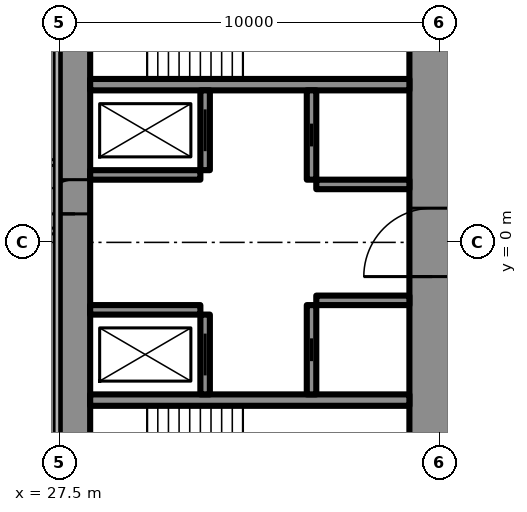
"""IFC4 building model, lengths in metres.
Left out: names, types, materials, properties, quantities, classifications, styles, units other than length and angle.
Written with IfcOpenShell. Run it as: python <this file> out.ifc"""

import sys

from ifc_helpers import new_model, si_unit, direction, frame, frame_2d, origin, place, context, subcontext, project, spatial, rectangle, extrude, element, fill, save


model = new_model("IFC4")
c1 = context("Model", 3, precision=1e-05, world=origin(), true_north=direction((0.0, 1.0)))
c2 = subcontext(c1, "Body", "Model", "MODEL_VIEW")
j1 = project(units=[si_unit("LENGTHUNIT", "METRE"), si_unit("PLANEANGLEUNIT", "RADIAN")], contexts=[c1])
p1 = place(None, origin())
s1 = spatial("IfcSite", under=j1, at=p1, CompositionType="ELEMENT")
p2 = place(p1, origin())
s2 = spatial("IfcBuilding", under=s1, at=p2, CompositionType="ELEMENT")
p3 = place(p2, frame((0.0, 0.0, 236.9)))
s3 = spatial("IfcBuildingStorey", under=s2, at=p3, CompositionType="ELEMENT", Elevation=236.9)
p4 = place(p3, frame((27.9, -8.6, 0.0), z_axis=(0.0, 0.0, 1.0), x_axis=(0.0, 1.0, 0.0)))
e1 = element("IfcWall", 1, at=p4, inside=s3, PredefinedType="SHEAR", context=c2, shape_type="SweptSolid", body=[
    extrude(rectangle(XDim=17.2, YDim=0.8, at=frame_2d((8.6, 0.0))), origin(), (0.0, 0.0, 1.0), 3.6),
])
p5 = place(p4, frame((9.35, 0.0, 0.0)))
e2 = element("IfcOpeningElement", 2, at=p5, cuts=e1, PredefinedType="OPENING", context=c2, shape_type="SweptSolid", body=[
    extrude(rectangle(XDim=0.9, YDim=2.2, at=frame_2d((0.45, 1.1))), frame((0.0, 0.41, 0.0), z_axis=(0.0, -1.0, 0.0), x_axis=(1.0, 0.0, 0.0)), (0.0, 0.0, 1.0), 0.82),
])
p6 = place(p3, frame((37.3, -8.6, 0.0), z_axis=(0.0, 0.0, 1.0), x_axis=(0.0, 1.0, 0.0)))
e3 = element("IfcWall", 3, at=p6, inside=s3, PredefinedType="SHEAR", context=c2, shape_type="SweptSolid", body=[
    extrude(rectangle(XDim=17.2, YDim=1.2, at=frame_2d((8.6, 0.0))), origin(), (0.0, 0.0, 1.0), 3.6),
])
p7 = place(p6, frame((7.7, 0.0, 0.0)))
e4 = element("IfcOpeningElement", 4, at=p7, cuts=e3, PredefinedType="OPENING", context=c2, shape_type="SweptSolid", body=[
    extrude(rectangle(XDim=1.8, YDim=2.2, at=frame_2d((0.9, 1.1))), frame((0.0, 0.61, 0.0), z_axis=(0.0, -1.0, 0.0), x_axis=(1.0, 0.0, 0.0)), (0.0, 0.0, 1.0), 1.22),
])
for number, where, z_axis, x_axis in (
    (5, (28.3, -4.15, 0.0), (0.0, 0.0, 1.0), (1.0, 0.0, 0.0)),
    (6, (28.3, 4.15, 0.0), (0.0, 0.0, 1.0), (1.0, 0.0, 0.0)),
):
    element("IfcWall", number, at=place(p3, frame(where, z_axis=z_axis, x_axis=x_axis)), inside=s3, PredefinedType="SHEAR", context=c2, shape_type="SweptSolid", body=[
        extrude(rectangle(XDim=8.4, YDim=0.3, at=frame_2d((4.2, 0.0))), origin(), (0.0, 0.0, 1.0), 3.6),
    ])
p8 = place(p3, frame((31.325, -4.0, 0.0), z_axis=(0.0, 0.0, 1.0), x_axis=(0.0, 1.0, 0.0)))
e7 = element("IfcWall", 7, at=p8, inside=s3, PredefinedType="SHEAR", context=c2, shape_type="SweptSolid", body=[
    extrude(rectangle(XDim=2.1, YDim=0.25, at=frame_2d((1.05, 0.0))), origin(), (0.0, 0.0, 1.0), 3.6),
])
p9 = place(p8, frame((0.5, 0.0, 0.0)))
e8 = element("IfcOpeningElement", 8, at=p9, cuts=e7, PredefinedType="OPENING", context=c2, shape_type="SweptSolid", body=[
    extrude(rectangle(XDim=1.1, YDim=2.2, at=frame_2d((0.55, 1.1))), frame((0.0, 0.135, 0.0), z_axis=(0.0, -1.0, 0.0), x_axis=(1.0, 0.0, 0.0)), (0.0, 0.0, 1.0), 0.27),
])
p10 = place(p3, frame((34.125, -4.0, 0.0), z_axis=(0.0, 0.0, 1.0), x_axis=(0.0, 1.0, 0.0)))
e9 = element("IfcWall", 9, at=p10, inside=s3, PredefinedType="SHEAR", context=c2, shape_type="SweptSolid", body=[
    extrude(rectangle(XDim=2.35, YDim=0.25, at=frame_2d((1.175, 0.0))), origin(), (0.0, 0.0, 1.0), 3.6),
])
p11 = place(p10, frame((0.875, 0.0, 0.0)))
e10 = element("IfcOpeningElement", 10, at=p11, cuts=e9, PredefinedType="OPENING", context=c2, shape_type="SweptSolid", body=[
    extrude(rectangle(XDim=0.6, YDim=2.0, at=frame_2d((0.3, 1.0))), frame((0.0, 0.135, 0.0), z_axis=(0.0, -1.0, 0.0), x_axis=(1.0, 0.0, 0.0)), (0.0, 0.0, 1.0), 0.27),
])
p12 = place(p3, frame((28.3, -1.775, 0.0), z_axis=(0.0, 0.0, 1.0), x_axis=(1.0, 0.0, 0.0)))
e11 = element("IfcWall", 11, at=p12, inside=s3, PredefinedType="SHEAR", context=c2, shape_type="SweptSolid", body=[
    extrude(rectangle(XDim=2.9, YDim=0.25, at=frame_2d((1.45, 0.0))), origin(), (0.0, 0.0, 1.0), 3.6),
])
p13 = place(p3, frame((34.25, -1.525, 0.0), z_axis=(0.0, 0.0, 1.0), x_axis=(1.0, 0.0, 0.0)))
e12 = element("IfcWall", 12, at=p13, inside=s3, PredefinedType="SHEAR", context=c2, shape_type="SweptSolid", body=[
    extrude(rectangle(XDim=2.45, YDim=0.25, at=frame_2d((1.225, 0.0))), origin(), (0.0, 0.0, 1.0), 3.6),
])
p14 = place(p3, frame((31.325, 1.9, 0.0), z_axis=(0.0, 0.0, 1.0), x_axis=(0.0, 1.0, 0.0)))
e13 = element("IfcWall", 13, at=p14, inside=s3, PredefinedType="SHEAR", context=c2, shape_type="SweptSolid", body=[
    extrude(rectangle(XDim=2.1, YDim=0.25, at=frame_2d((1.05, 0.0))), origin(), (0.0, 0.0, 1.0), 3.6),
])
p15 = place(p14, frame((0.5, 0.0, 0.0)))
e14 = element("IfcOpeningElement", 14, at=p15, cuts=e13, PredefinedType="OPENING", context=c2, shape_type="SweptSolid", body=[
    extrude(rectangle(XDim=1.1, YDim=2.2, at=frame_2d((0.55, 1.1))), frame((0.0, 0.135, 0.0), z_axis=(0.0, -1.0, 0.0), x_axis=(1.0, 0.0, 0.0)), (0.0, 0.0, 1.0), 0.27),
])
p16 = place(p3, frame((34.125, 1.65, 0.0), z_axis=(0.0, 0.0, 1.0), x_axis=(0.0, 1.0, 0.0)))
e15 = element("IfcWall", 15, at=p16, inside=s3, PredefinedType="SHEAR", context=c2, shape_type="SweptSolid", body=[
    extrude(rectangle(XDim=2.35, YDim=0.25, at=frame_2d((1.175, 0.0))), origin(), (0.0, 0.0, 1.0), 3.6),
])
p17 = place(p16, frame((0.875, 0.0, 0.0)))
e16 = element("IfcOpeningElement", 16, at=p17, cuts=e15, PredefinedType="OPENING", context=c2, shape_type="SweptSolid", body=[
    extrude(rectangle(XDim=0.6, YDim=2.0, at=frame_2d((0.3, 1.0))), frame((0.0, 0.135, 0.0), z_axis=(0.0, -1.0, 0.0), x_axis=(1.0, 0.0, 0.0)), (0.0, 0.0, 1.0), 0.27),
])
p18 = place(p3, frame((28.3, 1.775, 0.0), z_axis=(0.0, 0.0, 1.0), x_axis=(1.0, 0.0, 0.0)))
e17 = element("IfcWall", 17, at=p18, inside=s3, PredefinedType="SHEAR", context=c2, shape_type="SweptSolid", body=[
    extrude(rectangle(XDim=2.9, YDim=0.25, at=frame_2d((1.45, 0.0))), origin(), (0.0, 0.0, 1.0), 3.6),
])
p19 = place(p3, frame((34.25, 1.525, 0.0), z_axis=(0.0, 0.0, 1.0), x_axis=(1.0, 0.0, 0.0)))
e18 = element("IfcWall", 18, at=p19, inside=s3, PredefinedType="SHEAR", context=c2, shape_type="SweptSolid", body=[
    extrude(rectangle(XDim=2.45, YDim=0.25, at=frame_2d((1.225, 0.0))), origin(), (0.0, 0.0, 1.0), 3.6),
])
p20 = place(p3, frame((27.2, -13.8, 0.0), z_axis=(0.0, 0.0, 1.0), x_axis=(0.866027159892, 0.499996958321, 0.0)))
e19 = element("IfcWall", 19, at=p20, inside=s3, PredefinedType="SHEAR", context=c2, shape_type="SweptSolid", body=[
    extrude(rectangle(XDim=27.947, YDim=1.2, at=frame_2d((13.973, 0.0))), origin(), (0.0, 0.0, 1.0), 3.6),
])
p21 = place(p20, frame((4.6, 0.0, 0.0)))
e20 = element("IfcOpeningElement", 20, at=p21, cuts=e19, PredefinedType="OPENING", context=c2, shape_type="SweptSolid", body=[
    extrude(rectangle(XDim=1.0, YDim=2.2, at=frame_2d((0.5, 1.1))), frame((0.0, 0.61, 0.0), z_axis=(0.0, -1.0, 0.0), x_axis=(1.0, 0.0, 0.0)), (0.0, 0.0, 1.0), 1.22),
])
p22 = place(p20, frame((13.395, 0.0, 0.0)))
e21 = element("IfcOpeningElement", 21, at=p22, cuts=e19, PredefinedType="OPENING", context=c2, shape_type="SweptSolid", body=[
    extrude(rectangle(XDim=1.8, YDim=2.2, at=frame_2d((0.9, 1.1))), frame((0.0, 0.61, 0.0), z_axis=(0.0, -1.0, 0.0), x_axis=(1.0, 0.0, 0.0)), (0.0, 0.0, 1.0), 1.22),
])
p23 = place(p3, frame((27.2, 13.8, 0.0), z_axis=(0.0, 0.0, 1.0), x_axis=(0.866024515034, -0.500001539357, 0.0)))
e22 = element("IfcWall", 22, at=p23, inside=s3, PredefinedType="SHEAR", context=c2, shape_type="SweptSolid", body=[
    extrude(rectangle(XDim=26.907, YDim=1.2, at=frame_2d((13.454, 0.0))), origin(), (0.0, 0.0, 1.0), 3.6),
])
p24 = place(p23, frame((4.6, 0.0, 0.0)))
e23 = element("IfcOpeningElement", 23, at=p24, cuts=e22, PredefinedType="OPENING", context=c2, shape_type="SweptSolid", body=[
    extrude(rectangle(XDim=1.0, YDim=2.2, at=frame_2d((0.5, 1.1))), frame((0.0, 0.61, 0.0), z_axis=(0.0, -1.0, 0.0), x_axis=(1.0, 0.0, 0.0)), (0.0, 0.0, 1.0), 1.22),
])
p25 = place(p23, frame((13.395, 0.0, 0.0)))
e24 = element("IfcOpeningElement", 24, at=p25, cuts=e22, PredefinedType="OPENING", context=c2, shape_type="SweptSolid", body=[
    extrude(rectangle(XDim=1.8, YDim=2.2, at=frame_2d((0.9, 1.1))), frame((0.0, 0.61, 0.0), z_axis=(0.0, -1.0, 0.0), x_axis=(1.0, 0.0, 0.0)), (0.0, 0.0, 1.0), 1.22),
])
p26 = place(p3, frame((28.959, -15.44, 0.0), z_axis=(0.0, 0.0, 1.0), x_axis=(0.866025227435, 0.500000305447, 0.0)))
e25 = element("IfcWall", 25, at=p26, inside=s3, PredefinedType="PARTITIONING", context=c2, shape_type="SweptSolid", body=[
    extrude(rectangle(XDim=30.88, YDim=0.2, at=frame_2d((15.44, 0.0))), origin(), (0.0, 0.0, 1.0), 3.35),
])
p27 = place(p26, frame((1.494, 0.0, 0.0)))
e26 = element("IfcOpeningElement", 26, at=p27, cuts=e25, PredefinedType="OPENING", context=c2, shape_type="SweptSolid", body=[
    extrude(rectangle(XDim=1.8, YDim=2.03, at=frame_2d((0.9, 1.015))), frame((0.0, 0.11, 0.0), z_axis=(0.0, -1.0, 0.0), x_axis=(1.0, 0.0, 0.0)), (0.0, 0.0, 1.0), 0.22),
])
p28 = place(p26, frame((7.687, 0.0, 0.0)))
e27 = element("IfcOpeningElement", 27, at=p28, cuts=e25, PredefinedType="OPENING", context=c2, shape_type="SweptSolid", body=[
    extrude(rectangle(XDim=1.0, YDim=2.2, at=frame_2d((0.5, 1.1))), frame((0.0, 0.11, 0.0), z_axis=(0.0, -1.0, 0.0), x_axis=(1.0, 0.0, 0.0)), (0.0, 0.0, 1.0), 0.22),
])
p29 = place(p26, frame((16.137, 0.0, 0.0)))
e28 = element("IfcOpeningElement", 28, at=p29, cuts=e25, PredefinedType="OPENING", context=c2, shape_type="SweptSolid", body=[
    extrude(rectangle(XDim=0.95, YDim=2.2, at=frame_2d((0.475, 1.1))), frame((0.0, 0.11, 0.0), z_axis=(0.0, -1.0, 0.0), x_axis=(1.0, 0.0, 0.0)), (0.0, 0.0, 1.0), 0.22),
])
p30 = place(p26, frame((20.021, 0.0, 0.0)))
e29 = element("IfcOpeningElement", 29, at=p30, cuts=e25, PredefinedType="OPENING", context=c2, shape_type="SweptSolid", body=[
    extrude(rectangle(XDim=0.95, YDim=2.2, at=frame_2d((0.475, 1.1))), frame((0.0, 0.11, 0.0), z_axis=(0.0, -1.0, 0.0), x_axis=(1.0, 0.0, 0.0)), (0.0, 0.0, 1.0), 0.22),
])
p31 = place(p26, frame((26.253, 0.0, 0.0)))
e30 = element("IfcOpeningElement", 30, at=p31, cuts=e25, PredefinedType="OPENING", context=c2, shape_type="SweptSolid", body=[
    extrude(rectangle(XDim=0.95, YDim=2.2, at=frame_2d((0.475, 1.1))), frame((0.0, 0.11, 0.0), z_axis=(0.0, -1.0, 0.0), x_axis=(1.0, 0.0, 0.0)), (0.0, 0.0, 1.0), 0.22),
])
p32 = place(p3, frame((-27.5, 0.3, 0.0), z_axis=(0.0, 0.0, 1.0), x_axis=(1.0, 0.0, 0.0)))
e31 = element("IfcWall", 31, at=p32, inside=s3, PredefinedType="PARTITIONING", context=c2, shape_type="SweptSolid", body=[
    extrude(rectangle(XDim=55.0, YDim=0.15, at=frame_2d((27.5, 0.0))), origin(), (0.0, 0.0, 1.0), 2.4),
])
p33 = place(p32, frame((1.575, 0.0, 0.0)))
e32 = element("IfcOpeningElement", 32, at=p33, cuts=e31, PredefinedType="OPENING", context=c2, shape_type="SweptSolid", body=[
    extrude(rectangle(XDim=1.0, YDim=2.2, at=frame_2d((0.5, 1.1))), frame((0.0, 0.085, 0.0), z_axis=(0.0, -1.0, 0.0), x_axis=(1.0, 0.0, 0.0)), (0.0, 0.0, 1.0), 0.17),
])
p34 = place(p32, frame((8.525, 0.0, 0.0)))
e33 = element("IfcOpeningElement", 33, at=p34, cuts=e31, PredefinedType="OPENING", context=c2, shape_type="SweptSolid", body=[
    extrude(rectangle(XDim=1.05, YDim=2.4, at=frame_2d((0.525, 1.2))), frame((0.0, 0.085, 0.0), z_axis=(0.0, -1.0, 0.0), x_axis=(1.0, 0.0, 0.0)), (0.0, 0.0, 1.0), 0.17),
])
p35 = place(p32, frame((14.025, 0.0, 0.0)))
e34 = element("IfcOpeningElement", 34, at=p35, cuts=e31, PredefinedType="OPENING", context=c2, shape_type="SweptSolid", body=[
    extrude(rectangle(XDim=1.05, YDim=2.4, at=frame_2d((0.525, 1.2))), frame((0.0, 0.085, 0.0), z_axis=(0.0, -1.0, 0.0), x_axis=(1.0, 0.0, 0.0)), (0.0, 0.0, 1.0), 0.17),
])
p36 = place(p32, frame((25.025, 0.0, 0.0)))
e35 = element("IfcOpeningElement", 35, at=p36, cuts=e31, PredefinedType="OPENING", context=c2, shape_type="SweptSolid", body=[
    extrude(rectangle(XDim=1.05, YDim=2.4, at=frame_2d((0.525, 1.2))), frame((0.0, 0.085, 0.0), z_axis=(0.0, -1.0, 0.0), x_axis=(1.0, 0.0, 0.0)), (0.0, 0.0, 1.0), 0.17),
])
p37 = place(p32, frame((30.525, 0.0, 0.0)))
e36 = element("IfcOpeningElement", 36, at=p37, cuts=e31, PredefinedType="OPENING", context=c2, shape_type="SweptSolid", body=[
    extrude(rectangle(XDim=1.05, YDim=2.4, at=frame_2d((0.525, 1.2))), frame((0.0, 0.085, 0.0), z_axis=(0.0, -1.0, 0.0), x_axis=(1.0, 0.0, 0.0)), (0.0, 0.0, 1.0), 0.17),
])
p38 = place(p32, frame((41.525, 0.0, 0.0)))
e37 = element("IfcOpeningElement", 37, at=p38, cuts=e31, PredefinedType="OPENING", context=c2, shape_type="SweptSolid", body=[
    extrude(rectangle(XDim=1.05, YDim=2.4, at=frame_2d((0.525, 1.2))), frame((0.0, 0.085, 0.0), z_axis=(0.0, -1.0, 0.0), x_axis=(1.0, 0.0, 0.0)), (0.0, 0.0, 1.0), 0.17),
])
p39 = place(p32, frame((47.025, 0.0, 0.0)))
e38 = element("IfcOpeningElement", 38, at=p39, cuts=e31, PredefinedType="OPENING", context=c2, shape_type="SweptSolid", body=[
    extrude(rectangle(XDim=1.05, YDim=2.4, at=frame_2d((0.525, 1.2))), frame((0.0, 0.085, 0.0), z_axis=(0.0, -1.0, 0.0), x_axis=(1.0, 0.0, 0.0)), (0.0, 0.0, 1.0), 0.17),
])
p40 = place(p32, frame((52.525, 0.0, 0.0)))
e39 = element("IfcOpeningElement", 39, at=p40, cuts=e31, PredefinedType="OPENING", context=c2, shape_type="SweptSolid", body=[
    extrude(rectangle(XDim=1.05, YDim=2.4, at=frame_2d((0.525, 1.2))), frame((0.0, 0.085, 0.0), z_axis=(0.0, -1.0, 0.0), x_axis=(1.0, 0.0, 0.0)), (0.0, 0.0, 1.0), 0.17),
])
p41 = place(p3, frame((-10.65, 2.1, 0.0), z_axis=(0.0, 0.0, 1.0), x_axis=(1.0, 0.0, 0.0)))
e40 = element("IfcWall", 40, at=p41, inside=s3, PredefinedType="PARTITIONING", context=c2, shape_type="SweptSolid", body=[
    extrude(rectangle(XDim=38.15, YDim=0.15, at=frame_2d((19.075, 0.0))), origin(), (0.0, 0.0, 1.0), 3.4),
])
p42 = place(p41, frame((2.675, 0.0, 0.0)))
e41 = element("IfcOpeningElement", 41, at=p42, cuts=e40, PredefinedType="OPENING", context=c2, shape_type="SweptSolid", body=[
    extrude(rectangle(XDim=1.05, YDim=2.4, at=frame_2d((0.525, 1.2))), frame((0.0, 0.085, 0.0), z_axis=(0.0, -1.0, 0.0), x_axis=(1.0, 0.0, 0.0)), (0.0, 0.0, 1.0), 0.17),
])
p43 = place(p41, frame((13.675, 0.0, 0.0)))
e42 = element("IfcOpeningElement", 42, at=p43, cuts=e40, PredefinedType="OPENING", context=c2, shape_type="SweptSolid", body=[
    extrude(rectangle(XDim=1.05, YDim=2.4, at=frame_2d((0.525, 1.2))), frame((0.0, 0.085, 0.0), z_axis=(0.0, -1.0, 0.0), x_axis=(1.0, 0.0, 0.0)), (0.0, 0.0, 1.0), 0.17),
])
p44 = place(p41, frame((24.675, 0.0, 0.0)))
e43 = element("IfcOpeningElement", 43, at=p44, cuts=e40, PredefinedType="OPENING", context=c2, shape_type="SweptSolid", body=[
    extrude(rectangle(XDim=1.05, YDim=2.4, at=frame_2d((0.525, 1.2))), frame((0.0, 0.085, 0.0), z_axis=(0.0, -1.0, 0.0), x_axis=(1.0, 0.0, 0.0)), (0.0, 0.0, 1.0), 0.17),
])
p45 = place(p41, frame((30.175, 0.0, 0.0)))
e44 = element("IfcOpeningElement", 44, at=p45, cuts=e40, PredefinedType="OPENING", context=c2, shape_type="SweptSolid", body=[
    extrude(rectangle(XDim=1.05, YDim=2.4, at=frame_2d((0.525, 1.2))), frame((0.0, 0.085, 0.0), z_axis=(0.0, -1.0, 0.0), x_axis=(1.0, 0.0, 0.0)), (0.0, 0.0, 1.0), 0.17),
])
p46 = place(p41, frame((35.675, 0.0, 0.0)))
e45 = element("IfcOpeningElement", 45, at=p46, cuts=e40, PredefinedType="OPENING", context=c2, shape_type="SweptSolid", body=[
    extrude(rectangle(XDim=1.05, YDim=2.4, at=frame_2d((0.525, 1.2))), frame((0.0, 0.085, 0.0), z_axis=(0.0, -1.0, 0.0), x_axis=(1.0, 0.0, 0.0)), (0.0, 0.0, 1.0), 0.17),
])
p47 = place(p7, origin())
e46 = element("IfcDoor", 46, at=p47, inside=s3, OperationType="DOUBLE_DOOR_SINGLE_SWING", PredefinedType="DOOR", context=c2, shape_type="SweptSolid", body=[
    extrude(rectangle(XDim=1.8, YDim=2.2, at=frame_2d((0.9, 1.1))), frame((0.0, 0.025, 0.0), z_axis=(0.0, -1.0, 0.0), x_axis=(1.0, 0.0, 0.0)), (0.0, 0.0, 1.0), 0.05),
])
fill(e4, e46)
p48 = place(p5, origin())
e47 = element("IfcDoor", 47, at=p48, inside=s3, OperationType="SINGLE_SWING_LEFT", PredefinedType="DOOR", context=c2, shape_type="SweptSolid", body=[
    extrude(rectangle(XDim=0.9, YDim=2.2, at=frame_2d((0.45, 1.1))), frame((0.0, 0.025, 0.0), z_axis=(0.0, -1.0, 0.0), x_axis=(1.0, 0.0, 0.0)), (0.0, 0.0, 1.0), 0.05),
])
fill(e2, e47)
p49 = place(p9, origin())
e48 = element("IfcDoor", 48, at=p49, inside=s3, OperationType="SLIDING_TO_LEFT", PredefinedType="USERDEFINED", context=c2, shape_type="SweptSolid", body=[
    extrude(rectangle(XDim=1.1, YDim=2.2, at=frame_2d((0.55, 1.1))), frame((0.0, 0.025, 0.0), z_axis=(0.0, -1.0, 0.0), x_axis=(1.0, 0.0, 0.0)), (0.0, 0.0, 1.0), 0.05),
])
fill(e8, e48)
p50 = place(p15, origin())
e49 = element("IfcDoor", 49, at=p50, inside=s3, OperationType="SLIDING_TO_LEFT", PredefinedType="USERDEFINED", context=c2, shape_type="SweptSolid", body=[
    extrude(rectangle(XDim=1.1, YDim=2.2, at=frame_2d((0.55, 1.1))), frame((0.0, 0.025, 0.0), z_axis=(0.0, -1.0, 0.0), x_axis=(1.0, 0.0, 0.0)), (0.0, 0.0, 1.0), 0.05),
])
fill(e14, e49)
p51 = place(p11, origin())
e50 = element("IfcDoor", 50, at=p51, inside=s3, OperationType="SLIDING_TO_LEFT", PredefinedType="DOOR", context=c2, shape_type="SweptSolid", body=[
    extrude(rectangle(XDim=0.6, YDim=2.0, at=frame_2d((0.3, 1.0))), frame((0.0, 0.025, 0.0), z_axis=(0.0, -1.0, 0.0), x_axis=(1.0, 0.0, 0.0)), (0.0, 0.0, 1.0), 0.05),
])
fill(e10, e50)
p52 = place(p17, origin())
e51 = element("IfcDoor", 51, at=p52, inside=s3, OperationType="SLIDING_TO_LEFT", PredefinedType="DOOR", context=c2, shape_type="SweptSolid", body=[
    extrude(rectangle(XDim=0.6, YDim=2.0, at=frame_2d((0.3, 1.0))), frame((0.0, 0.025, 0.0), z_axis=(0.0, -1.0, 0.0), x_axis=(1.0, 0.0, 0.0)), (0.0, 0.0, 1.0), 0.05),
])
fill(e16, e51)
save(model, sys.argv[1])
